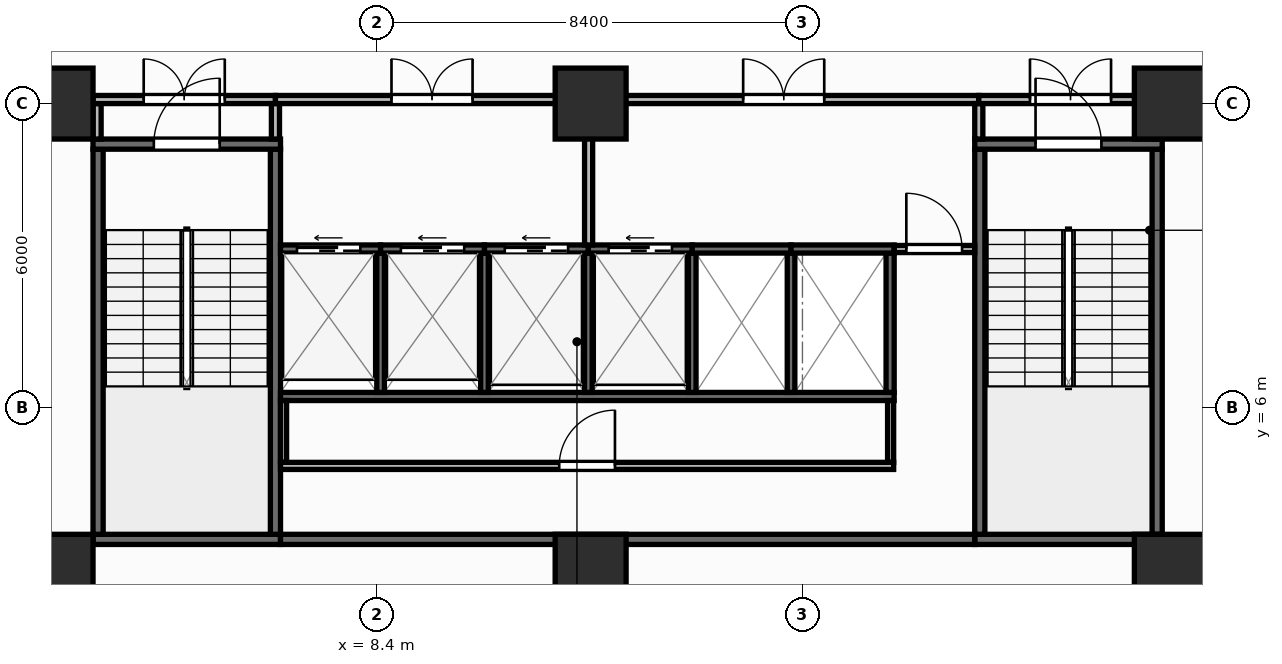
"""IFC4 building model, lengths in metres.
Left out: names, types, materials, properties, quantities, classifications, styles, units other than length and angle.
Written with IfcOpenShell. Run it as: python <this file> out.ifc"""

import sys

from ifc_helpers import new_model, si_unit, direction, frame, frame_2d, origin, origin_2d, place, context, subcontext, project, spatial, rectangle, extrude, element, fill, save


model = new_model("IFC4")
c1 = context("Model", 3, precision=1e-05, world=origin(), true_north=direction((0.0, 1.0)))
c2 = subcontext(c1, "Body", "Model", "MODEL_VIEW")
j1 = project(units=[si_unit("LENGTHUNIT", "METRE"), si_unit("PLANEANGLEUNIT", "RADIAN")], contexts=[c1])
p1 = place(None, origin())
s1 = spatial("IfcSite", under=j1, at=p1, CompositionType="ELEMENT")
p2 = place(p1, origin())
s2 = spatial("IfcBuilding", under=s1, at=p2, CompositionType="ELEMENT")
p3 = place(p2, frame((0.0, 0.0, 9.0)))
s3 = spatial("IfcBuildingStorey", under=s2, at=p3, CompositionType="ELEMENT", Elevation=9.0)
for number, where, z_axis, x_axis in (
    (1, (2.1, 2.8, 0.0), (0.0, 0.0, 1.0), (1.0, 0.0, 0.0)),
    (2, (12.62, 2.8, 0.0), (0.0, 0.0, 1.0), (1.0, 0.0, 0.0)),
    (3, (24.05, 2.8, 0.0), (0.0, 0.0, 1.0), (1.0, 0.0, 0.0)),
    (4, (2.1, 12.0, 0.0), (0.0, 0.0, 1.0), (1.0, 0.0, 0.0)),
    (5, (12.62, 12.0, 0.0), (0.0, 0.0, 1.0), (1.0, 0.0, 0.0)),
    (6, (24.05, 12.0, 0.0), (0.0, 0.0, 1.0), (1.0, 0.0, 0.0)),
):
    element("IfcColumn", number, at=place(p3, frame(where, z_axis=z_axis, x_axis=x_axis)), inside=s3, PredefinedType="COLUMN", context=c2, shape_type="SweptSolid", body=[
        extrude(rectangle(XDim=1.4, YDim=1.4, at=origin_2d()), origin(), (0.0, 0.0, 1.0), 4.5),
    ])
p4 = place(p3, frame((2.8, 3.4, 0.0), z_axis=(0.0, 0.0, 1.0), x_axis=(1.0, 0.0, 0.0)))
e7 = element("IfcWall", 7, at=p4, inside=s3, PredefinedType="SHEAR", context=c2, shape_type="SweptSolid", body=[
    extrude(rectangle(XDim=3.7, YDim=0.2, at=frame_2d((1.85, 0.0))), origin(), (0.0, 0.0, 1.0), 4.25),
])
for number, where, z_axis, x_axis in (
    (8, (2.9, 3.5, 0.0), (0.0, 0.0, 1.0), (0.0, 1.0, 0.0)),
    (9, (6.4, 3.5, 0.0), (0.0, 0.0, 1.0), (0.0, 1.0, 0.0)),
):
    element("IfcWall", number, at=place(p3, frame(where, z_axis=z_axis, x_axis=x_axis)), inside=s3, PredefinedType="SHEAR", context=c2, shape_type="SweptSolid", body=[
        extrude(rectangle(XDim=7.6, YDim=0.2, at=frame_2d((3.8, 0.0))), origin(), (0.0, 0.0, 1.0), 4.25),
    ])
p5 = place(p3, frame((2.8, 11.2, 0.0), z_axis=(0.0, 0.0, 1.0), x_axis=(1.0, 0.0, 0.0)))
e10 = element("IfcWall", 10, at=p5, inside=s3, PredefinedType="SHEAR", context=c2, shape_type="SweptSolid", body=[
    extrude(rectangle(XDim=3.7, YDim=0.2, at=frame_2d((1.85, 0.0))), origin(), (0.0, 0.0, 1.0), 4.25),
])
p6 = place(p5, frame((1.2, 0.0, 0.0)))
e11 = element("IfcOpeningElement", 11, at=p6, cuts=e10, PredefinedType="OPENING", context=c2, shape_type="SweptSolid", body=[
    extrude(rectangle(XDim=1.3, YDim=2.15, at=frame_2d((0.65, 1.075))), frame((0.0, 0.11, 0.0), z_axis=(0.0, -1.0, 0.0), x_axis=(1.0, 0.0, 0.0)), (0.0, 0.0, 1.0), 0.22),
])
p7 = place(p3, frame((20.2, 3.4, 0.0), z_axis=(0.0, 0.0, 1.0), x_axis=(1.0, 0.0, 0.0)))
e12 = element("IfcWall", 12, at=p7, inside=s3, PredefinedType="SHEAR", context=c2, shape_type="SweptSolid", body=[
    extrude(rectangle(XDim=3.7, YDim=0.2, at=frame_2d((1.85, 0.0))), origin(), (0.0, 0.0, 1.0), 4.25),
])
for number, where, z_axis, x_axis in (
    (13, (20.3, 3.5, 0.0), (0.0, 0.0, 1.0), (0.0, 1.0, 0.0)),
    (14, (23.8, 3.5, 0.0), (0.0, 0.0, 1.0), (0.0, 1.0, 0.0)),
):
    element("IfcWall", number, at=place(p3, frame(where, z_axis=z_axis, x_axis=x_axis)), inside=s3, PredefinedType="SHEAR", context=c2, shape_type="SweptSolid", body=[
        extrude(rectangle(XDim=7.6, YDim=0.2, at=frame_2d((3.8, 0.0))), origin(), (0.0, 0.0, 1.0), 4.25),
    ])
p8 = place(p3, frame((20.2, 11.2, 0.0), z_axis=(0.0, 0.0, 1.0), x_axis=(1.0, 0.0, 0.0)))
e15 = element("IfcWall", 15, at=p8, inside=s3, PredefinedType="SHEAR", context=c2, shape_type="SweptSolid", body=[
    extrude(rectangle(XDim=3.7, YDim=0.2, at=frame_2d((1.85, 0.0))), origin(), (0.0, 0.0, 1.0), 4.25),
])
p9 = place(p8, frame((1.2, 0.0, 0.0)))
e16 = element("IfcOpeningElement", 16, at=p9, cuts=e15, PredefinedType="OPENING", context=c2, shape_type="SweptSolid", body=[
    extrude(rectangle(XDim=1.3, YDim=2.15, at=frame_2d((0.65, 1.075))), frame((0.0, 0.11, 0.0), z_axis=(0.0, -1.0, 0.0), x_axis=(1.0, 0.0, 0.0)), (0.0, 0.0, 1.0), 0.22),
])
p10 = place(p3, frame((6.5, 3.4, 0.0), z_axis=(0.0, 0.0, 1.0), x_axis=(1.0, 0.0, 0.0)))
e17 = element("IfcWall", 17, at=p10, inside=s3, PredefinedType="SHEAR", context=c2, shape_type="SweptSolid", body=[
    extrude(rectangle(XDim=13.7, YDim=0.2, at=frame_2d((6.85, 0.0))), origin(), (0.0, 0.0, 1.0), 4.25),
])
p11 = place(p3, frame((6.5, 6.22, 0.0), z_axis=(0.0, 0.0, 1.0), x_axis=(1.0, 0.0, 0.0)))
e18 = element("IfcWall", 18, at=p11, inside=s3, PredefinedType="SHEAR", context=c2, shape_type="SweptSolid", body=[
    extrude(rectangle(XDim=12.11, YDim=0.16, at=frame_2d((6.055, 0.0))), origin(), (0.0, 0.0, 1.0), 4.25),
])
p12 = place(p3, frame((18.53, 6.3, 0.0), z_axis=(0.0, 0.0, 1.0), x_axis=(0.0, 1.0, 0.0)))
e19 = element("IfcWall", 19, at=p12, inside=s3, PredefinedType="SHEAR", context=c2, shape_type="SweptSolid", body=[
    extrude(rectangle(XDim=2.75, YDim=0.16, at=frame_2d((1.375, 0.0))), origin(), (0.0, 0.0, 1.0), 4.25),
])
for number, where, z_axis, x_axis in (
    (20, (8.475, 6.3, 0.0), (0.0, 0.0, 1.0), (0.0, 1.0, 0.0)),
    (21, (10.525, 6.3, 0.0), (0.0, 0.0, 1.0), (0.0, 1.0, 0.0)),
    (22, (12.575, 6.3, 0.0), (0.0, 0.0, 1.0), (0.0, 1.0, 0.0)),
    (23, (14.625, 6.3, 0.0), (0.0, 0.0, 1.0), (0.0, 1.0, 0.0)),
    (24, (16.575, 6.3, 0.0), (0.0, 0.0, 1.0), (0.0, 1.0, 0.0)),
):
    element("IfcWall", number, at=place(p3, frame(where, z_axis=z_axis, x_axis=x_axis)), inside=s3, PredefinedType="SHEAR", context=c2, shape_type="SweptSolid", body=[
        extrude(rectangle(XDim=2.75, YDim=0.15, at=frame_2d((1.375, 0.0))), origin(), (0.0, 0.0, 1.0), 4.25),
    ])
p13 = place(p3, frame((6.5, 9.13, 0.0), z_axis=(0.0, 0.0, 1.0), x_axis=(1.0, 0.0, 0.0)))
e25 = element("IfcWall", 25, at=p13, inside=s3, PredefinedType="SHEAR", context=c2, shape_type="SweptSolid", body=[
    extrude(rectangle(XDim=1.975, YDim=0.16, at=frame_2d((0.988, 0.0))), origin(), (0.0, 0.0, 1.0), 4.25),
])
p14 = place(p13, frame((0.325, 0.0, 0.0)))
e26 = element("IfcOpeningElement", 26, at=p14, cuts=e25, PredefinedType="OPENING", context=c2, shape_type="SweptSolid", body=[
    extrude(rectangle(XDim=1.25, YDim=2.15, at=frame_2d((0.625, 1.075))), frame((0.0, 0.09, 0.0), z_axis=(0.0, -1.0, 0.0), x_axis=(1.0, 0.0, 0.0)), (0.0, 0.0, 1.0), 0.18),
])
p15 = place(p3, frame((8.475, 9.13, 0.0), z_axis=(0.0, 0.0, 1.0), x_axis=(1.0, 0.0, 0.0)))
e27 = element("IfcWall", 27, at=p15, inside=s3, PredefinedType="SHEAR", context=c2, shape_type="SweptSolid", body=[
    extrude(rectangle(XDim=2.05, YDim=0.16, at=frame_2d((1.025, 0.0))), origin(), (0.0, 0.0, 1.0), 4.25),
])
p16 = place(p15, frame((0.4, 0.0, 0.0)))
e28 = element("IfcOpeningElement", 28, at=p16, cuts=e27, PredefinedType="OPENING", context=c2, shape_type="SweptSolid", body=[
    extrude(rectangle(XDim=1.25, YDim=2.15, at=frame_2d((0.625, 1.075))), frame((0.0, 0.09, 0.0), z_axis=(0.0, -1.0, 0.0), x_axis=(1.0, 0.0, 0.0)), (0.0, 0.0, 1.0), 0.18),
])
p17 = place(p3, frame((10.525, 9.13, 0.0), z_axis=(0.0, 0.0, 1.0), x_axis=(1.0, 0.0, 0.0)))
e29 = element("IfcWall", 29, at=p17, inside=s3, PredefinedType="SHEAR", context=c2, shape_type="SweptSolid", body=[
    extrude(rectangle(XDim=2.05, YDim=0.16, at=frame_2d((1.025, 0.0))), origin(), (0.0, 0.0, 1.0), 4.25),
])
p18 = place(p17, frame((0.4, 0.0, 0.0)))
e30 = element("IfcOpeningElement", 30, at=p18, cuts=e29, PredefinedType="OPENING", context=c2, shape_type="SweptSolid", body=[
    extrude(rectangle(XDim=1.25, YDim=2.15, at=frame_2d((0.625, 1.075))), frame((0.0, 0.09, 0.0), z_axis=(0.0, -1.0, 0.0), x_axis=(1.0, 0.0, 0.0)), (0.0, 0.0, 1.0), 0.18),
])
p19 = place(p3, frame((12.575, 9.13, 0.0), z_axis=(0.0, 0.0, 1.0), x_axis=(1.0, 0.0, 0.0)))
e31 = element("IfcWall", 31, at=p19, inside=s3, PredefinedType="SHEAR", context=c2, shape_type="SweptSolid", body=[
    extrude(rectangle(XDim=2.05, YDim=0.16, at=frame_2d((1.025, 0.0))), origin(), (0.0, 0.0, 1.0), 4.25),
])
p20 = place(p19, frame((0.4, 0.0, 0.0)))
e32 = element("IfcOpeningElement", 32, at=p20, cuts=e31, PredefinedType="OPENING", context=c2, shape_type="SweptSolid", body=[
    extrude(rectangle(XDim=1.25, YDim=2.15, at=frame_2d((0.625, 1.075))), frame((0.0, 0.09, 0.0), z_axis=(0.0, -1.0, 0.0), x_axis=(1.0, 0.0, 0.0)), (0.0, 0.0, 1.0), 0.18),
])
p21 = place(p3, frame((14.625, 9.13, 0.0), z_axis=(0.0, 0.0, 1.0), x_axis=(1.0, 0.0, 0.0)))
e33 = element("IfcWall", 33, at=p21, inside=s3, PredefinedType="SHEAR", context=c2, shape_type="SweptSolid", body=[
    extrude(rectangle(XDim=1.95, YDim=0.16, at=frame_2d((0.975, 0.0))), origin(), (0.0, 0.0, 1.0), 4.25),
])
p22 = place(p3, frame((16.575, 9.13, 0.0), z_axis=(0.0, 0.0, 1.0), x_axis=(1.0, 0.0, 0.0)))
e34 = element("IfcWall", 34, at=p22, inside=s3, PredefinedType="SHEAR", context=c2, shape_type="SweptSolid", body=[
    extrude(rectangle(XDim=2.035, YDim=0.16, at=frame_2d((1.018, 0.0))), origin(), (0.0, 0.0, 1.0), 4.25),
])
for number, where, z_axis, x_axis in (
    (35, (6.56, 4.92, 0.0), (0.0, 0.0, 1.0), (0.0, 1.0, 0.0)),
    (36, (18.54, 4.92, 0.0), (0.0, 0.0, 1.0), (0.0, 1.0, 0.0)),
):
    element("IfcWall", number, at=place(p3, frame(where, z_axis=z_axis, x_axis=x_axis)), inside=s3, PredefinedType="PARTITIONING", context=c2, shape_type="SweptSolid", body=[
        extrude(rectangle(XDim=1.22, YDim=0.12, at=frame_2d((0.61, 0.0))), origin(), (0.0, 0.0, 1.0), 4.25),
    ])
p23 = place(p3, frame((6.5, 4.85, 0.0), z_axis=(0.0, 0.0, 1.0), x_axis=(1.0, 0.0, 0.0)))
e37 = element("IfcWall", 37, at=p23, inside=s3, PredefinedType="PARTITIONING", context=c2, shape_type="SweptSolid", body=[
    extrude(rectangle(XDim=12.1, YDim=0.14, at=frame_2d((6.05, 0.0))), origin(), (0.0, 0.0, 1.0), 4.25),
])
p24 = place(p23, frame((5.5, 0.0, 0.0)))
e38 = element("IfcOpeningElement", 38, at=p24, cuts=e37, PredefinedType="OPENING", context=c2, shape_type="SweptSolid", body=[
    extrude(rectangle(XDim=1.1, YDim=2.1, at=frame_2d((0.55, 1.05))), frame((0.0, 0.08, 0.0), z_axis=(0.0, -1.0, 0.0), x_axis=(1.0, 0.0, 0.0)), (0.0, 0.0, 1.0), 0.16),
])
p25 = place(p3, frame((18.61, 9.13, 0.0), z_axis=(0.0, 0.0, 1.0), x_axis=(1.0, 0.0, 0.0)))
e39 = element("IfcWall", 39, at=p25, inside=s3, PredefinedType="PARTITIONING", context=c2, shape_type="SweptSolid", body=[
    extrude(rectangle(XDim=1.59, YDim=0.14, at=frame_2d((0.795, 0.0))), origin(), (0.0, 0.0, 1.0), 4.25),
])
p26 = place(p25, frame((0.24, 0.0, 0.0)))
e40 = element("IfcOpeningElement", 40, at=p26, cuts=e39, PredefinedType="OPENING", context=c2, shape_type="SweptSolid", body=[
    extrude(rectangle(XDim=1.1, YDim=2.1, at=frame_2d((0.55, 1.05))), frame((0.0, 0.08, 0.0), z_axis=(0.0, -1.0, 0.0), x_axis=(1.0, 0.0, 0.0)), (0.0, 0.0, 1.0), 0.16),
])
p27 = place(p3, frame((2.88, 11.3, 0.0), z_axis=(0.0, 0.0, 1.0), x_axis=(0.0, 1.0, 0.0)))
e41 = element("IfcWall", 41, at=p27, inside=s3, PredefinedType="PARTITIONING", context=c2, shape_type="SweptSolid", body=[
    extrude(rectangle(XDim=0.7, YDim=0.16, at=frame_2d((0.35, 0.0))), origin(), (0.0, 0.0, 1.0), 4.25),
])
p28 = place(p3, frame((2.8, 12.08, 0.0), z_axis=(0.0, 0.0, 1.0), x_axis=(1.0, 0.0, 0.0)))
e42 = element("IfcWall", 42, at=p28, inside=s3, PredefinedType="PARTITIONING", context=c2, shape_type="SweptSolid", body=[
    extrude(rectangle(XDim=3.6, YDim=0.16, at=frame_2d((1.8, 0.0))), origin(), (0.0, 0.0, 1.0), 3.425),
])
p29 = place(p28, frame((1.0, 0.0, 0.0)))
e43 = element("IfcOpeningElement", 43, at=p29, cuts=e42, PredefinedType="OPENING", context=c2, shape_type="SweptSolid", body=[
    extrude(rectangle(XDim=1.6, YDim=2.05, at=frame_2d((0.8, 1.025))), frame((0.0, 0.09, 0.0), z_axis=(0.0, -1.0, 0.0), x_axis=(1.0, 0.0, 0.0)), (0.0, 0.0, 1.0), 0.18),
])
p30 = place(p3, frame((6.4, 11.3, 0.0), z_axis=(0.0, 0.0, 1.0), x_axis=(0.0, 1.0, 0.0)))
e44 = element("IfcWall", 44, at=p30, inside=s3, PredefinedType="PARTITIONING", context=c2, shape_type="SweptSolid", body=[
    extrude(rectangle(XDim=0.7, YDim=0.16, at=frame_2d((0.35, 0.0))), origin(), (0.0, 0.0, 1.0), 4.25),
])
p31 = place(p3, frame((6.4, 12.08, 0.0), z_axis=(0.0, 0.0, 1.0), x_axis=(1.0, 0.0, 0.0)))
e45 = element("IfcWall", 45, at=p31, inside=s3, PredefinedType="PARTITIONING", context=c2, shape_type="SweptSolid", body=[
    extrude(rectangle(XDim=6.18, YDim=0.16, at=frame_2d((3.09, 0.0))), origin(), (0.0, 0.0, 1.0), 3.425),
])
p32 = place(p31, frame((2.29, 0.0, 0.0)))
e46 = element("IfcOpeningElement", 46, at=p32, cuts=e45, PredefinedType="OPENING", context=c2, shape_type="SweptSolid", body=[
    extrude(rectangle(XDim=1.6, YDim=2.05, at=frame_2d((0.8, 1.025))), frame((0.0, 0.09, 0.0), z_axis=(0.0, -1.0, 0.0), x_axis=(1.0, 0.0, 0.0)), (0.0, 0.0, 1.0), 0.18),
])
p33 = place(p3, frame((12.58, 9.21, 0.0), z_axis=(0.0, 0.0, 1.0), x_axis=(0.0, 1.0, 0.0)))
e47 = element("IfcWall", 47, at=p33, inside=s3, PredefinedType="PARTITIONING", context=c2, shape_type="SweptSolid", body=[
    extrude(rectangle(XDim=2.79, YDim=0.16, at=frame_2d((1.395, 0.0))), origin(), (0.0, 0.0, 1.0), 4.25),
])
p34 = place(p3, frame((12.58, 12.08, 0.0), z_axis=(0.0, 0.0, 1.0), x_axis=(1.0, 0.0, 0.0)))
e48 = element("IfcWall", 48, at=p34, inside=s3, PredefinedType="PARTITIONING", context=c2, shape_type="SweptSolid", body=[
    extrude(rectangle(XDim=7.7, YDim=0.16, at=frame_2d((3.85, 0.0))), origin(), (0.0, 0.0, 1.0), 3.425),
])
p35 = place(p34, frame((3.05, 0.0, 0.0)))
e49 = element("IfcOpeningElement", 49, at=p35, cuts=e48, PredefinedType="OPENING", context=c2, shape_type="SweptSolid", body=[
    extrude(rectangle(XDim=1.6, YDim=2.05, at=frame_2d((0.8, 1.025))), frame((0.0, 0.09, 0.0), z_axis=(0.0, -1.0, 0.0), x_axis=(1.0, 0.0, 0.0)), (0.0, 0.0, 1.0), 0.18),
])
p36 = place(p3, frame((20.28, 11.3, 0.0), z_axis=(0.0, 0.0, 1.0), x_axis=(0.0, 1.0, 0.0)))
e50 = element("IfcWall", 50, at=p36, inside=s3, PredefinedType="PARTITIONING", context=c2, shape_type="SweptSolid", body=[
    extrude(rectangle(XDim=0.7, YDim=0.16, at=frame_2d((0.35, 0.0))), origin(), (0.0, 0.0, 1.0), 4.25),
])
p37 = place(p3, frame((20.28, 12.08, 0.0), z_axis=(0.0, 0.0, 1.0), x_axis=(1.0, 0.0, 0.0)))
e51 = element("IfcWall", 51, at=p37, inside=s3, PredefinedType="PARTITIONING", context=c2, shape_type="SweptSolid", body=[
    extrude(rectangle(XDim=3.62, YDim=0.16, at=frame_2d((1.81, 0.0))), origin(), (0.0, 0.0, 1.0), 3.425),
])
p38 = place(p37, frame((1.01, 0.0, 0.0)))
e52 = element("IfcOpeningElement", 52, at=p38, cuts=e51, PredefinedType="OPENING", context=c2, shape_type="SweptSolid", body=[
    extrude(rectangle(XDim=1.6, YDim=2.05, at=frame_2d((0.8, 1.025))), frame((0.0, 0.09, 0.0), z_axis=(0.0, -1.0, 0.0), x_axis=(1.0, 0.0, 0.0)), (0.0, 0.0, 1.0), 0.18),
])
p39 = place(p3, frame((23.82, 11.3, 0.0), z_axis=(0.0, 0.0, 1.0), x_axis=(0.0, 1.0, 0.0)))
e53 = element("IfcWall", 53, at=p39, inside=s3, PredefinedType="PARTITIONING", context=c2, shape_type="SweptSolid", body=[
    extrude(rectangle(XDim=0.7, YDim=0.16, at=frame_2d((0.35, 0.0))), origin(), (0.0, 0.0, 1.0), 4.25),
])
p40 = place(p3, frame((24.02, 12.08, 0.0), z_axis=(0.0, 0.0, 1.0), x_axis=(1.0, 0.0, 0.0)))
e54 = element("IfcWall", 54, at=p40, inside=s3, PredefinedType="PARTITIONING", context=c2, shape_type="SweptSolid", body=[
    extrude(rectangle(XDim=1.65, YDim=0.16, at=frame_2d((0.825, 0.0))), origin(), (0.0, 0.0, 1.0), 3.425),
])
p41 = place(p6, origin())
e55 = element("IfcDoor", 55, at=p41, inside=s3, OperationType="SINGLE_SWING_RIGHT", PredefinedType="DOOR", context=c2, shape_type="SweptSolid", body=[
    extrude(rectangle(XDim=1.3, YDim=2.15, at=frame_2d((0.65, 1.075))), frame((0.0, 0.025, 0.0), z_axis=(0.0, -1.0, 0.0), x_axis=(1.0, 0.0, 0.0)), (0.0, 0.0, 1.0), 0.05),
])
fill(e11, e55)
p42 = place(p9, origin())
e56 = element("IfcDoor", 56, at=p42, inside=s3, OperationType="SINGLE_SWING_LEFT", PredefinedType="DOOR", context=c2, shape_type="SweptSolid", body=[
    extrude(rectangle(XDim=1.3, YDim=2.15, at=frame_2d((0.65, 1.075))), frame((0.0, 0.025, 0.0), z_axis=(0.0, -1.0, 0.0), x_axis=(1.0, 0.0, 0.0)), (0.0, 0.0, 1.0), 0.05),
])
fill(e16, e56)
p43 = place(p14, origin())
e57 = element("IfcDoor", 57, at=p43, inside=s3, OperationType="SLIDING_TO_LEFT", PredefinedType="DOOR", context=c2, shape_type="SweptSolid", body=[
    extrude(rectangle(XDim=1.25, YDim=2.15, at=frame_2d((0.625, 1.075))), frame((0.0, 0.025, 0.0), z_axis=(0.0, -1.0, 0.0), x_axis=(1.0, 0.0, 0.0)), (0.0, 0.0, 1.0), 0.05),
])
fill(e26, e57)
p44 = place(p16, origin())
e58 = element("IfcDoor", 58, at=p44, inside=s3, OperationType="SLIDING_TO_LEFT", PredefinedType="DOOR", context=c2, shape_type="SweptSolid", body=[
    extrude(rectangle(XDim=1.25, YDim=2.15, at=frame_2d((0.625, 1.075))), frame((0.0, 0.025, 0.0), z_axis=(0.0, -1.0, 0.0), x_axis=(1.0, 0.0, 0.0)), (0.0, 0.0, 1.0), 0.05),
])
fill(e28, e58)
p45 = place(p18, origin())
e59 = element("IfcDoor", 59, at=p45, inside=s3, OperationType="SLIDING_TO_LEFT", PredefinedType="DOOR", context=c2, shape_type="SweptSolid", body=[
    extrude(rectangle(XDim=1.25, YDim=2.15, at=frame_2d((0.625, 1.075))), frame((0.0, 0.025, 0.0), z_axis=(0.0, -1.0, 0.0), x_axis=(1.0, 0.0, 0.0)), (0.0, 0.0, 1.0), 0.05),
])
fill(e30, e59)
p46 = place(p20, origin())
e60 = element("IfcDoor", 60, at=p46, inside=s3, OperationType="SLIDING_TO_LEFT", PredefinedType="DOOR", context=c2, shape_type="SweptSolid", body=[
    extrude(rectangle(XDim=1.25, YDim=2.15, at=frame_2d((0.625, 1.075))), frame((0.0, 0.025, 0.0), z_axis=(0.0, -1.0, 0.0), x_axis=(1.0, 0.0, 0.0)), (0.0, 0.0, 1.0), 0.05),
])
fill(e32, e60)
p47 = place(p24, origin())
e61 = element("IfcDoor", 61, at=p47, inside=s3, OperationType="SINGLE_SWING_RIGHT", PredefinedType="DOOR", context=c2, shape_type="SweptSolid", body=[
    extrude(rectangle(XDim=1.1, YDim=2.1, at=frame_2d((0.55, 1.05))), frame((0.0, 0.025, 0.0), z_axis=(0.0, -1.0, 0.0), x_axis=(1.0, 0.0, 0.0)), (0.0, 0.0, 1.0), 0.05),
])
fill(e38, e61)
p48 = place(p26, origin())
e62 = element("IfcDoor", 62, at=p48, inside=s3, OperationType="SINGLE_SWING_LEFT", PredefinedType="DOOR", context=c2, shape_type="SweptSolid", body=[
    extrude(rectangle(XDim=1.1, YDim=2.1, at=frame_2d((0.55, 1.05))), frame((0.0, 0.025, 0.0), z_axis=(0.0, -1.0, 0.0), x_axis=(1.0, 0.0, 0.0)), (0.0, 0.0, 1.0), 0.05),
])
fill(e40, e62)
p49 = place(p29, origin())
e63 = element("IfcDoor", 63, at=p49, inside=s3, OperationType="DOUBLE_DOOR_SINGLE_SWING", PredefinedType="DOOR", context=c2, shape_type="SweptSolid", body=[
    extrude(rectangle(XDim=1.6, YDim=2.05, at=frame_2d((0.8, 1.025))), frame((0.0, 0.025, 0.0), z_axis=(0.0, -1.0, 0.0), x_axis=(1.0, 0.0, 0.0)), (0.0, 0.0, 1.0), 0.05),
])
fill(e43, e63)
p50 = place(p32, origin())
e64 = element("IfcDoor", 64, at=p50, inside=s3, OperationType="DOUBLE_DOOR_SINGLE_SWING", PredefinedType="DOOR", context=c2, shape_type="SweptSolid", body=[
    extrude(rectangle(XDim=1.6, YDim=2.05, at=frame_2d((0.8, 1.025))), frame((0.0, 0.025, 0.0), z_axis=(0.0, -1.0, 0.0), x_axis=(1.0, 0.0, 0.0)), (0.0, 0.0, 1.0), 0.05),
])
fill(e46, e64)
p51 = place(p35, origin())
e65 = element("IfcDoor", 65, at=p51, inside=s3, OperationType="DOUBLE_DOOR_SINGLE_SWING", PredefinedType="DOOR", context=c2, shape_type="SweptSolid", body=[
    extrude(rectangle(XDim=1.6, YDim=2.05, at=frame_2d((0.8, 1.025))), frame((0.0, 0.025, 0.0), z_axis=(0.0, -1.0, 0.0), x_axis=(1.0, 0.0, 0.0)), (0.0, 0.0, 1.0), 0.05),
])
fill(e49, e65)
p52 = place(p38, origin())
e66 = element("IfcDoor", 66, at=p52, inside=s3, OperationType="DOUBLE_DOOR_SINGLE_SWING", PredefinedType="DOOR", context=c2, shape_type="SweptSolid", body=[
    extrude(rectangle(XDim=1.6, YDim=2.05, at=frame_2d((0.8, 1.025))), frame((0.0, 0.025, 0.0), z_axis=(0.0, -1.0, 0.0), x_axis=(1.0, 0.0, 0.0)), (0.0, 0.0, 1.0), 0.05),
])
fill(e52, e66)
save(model, sys.argv[1])
